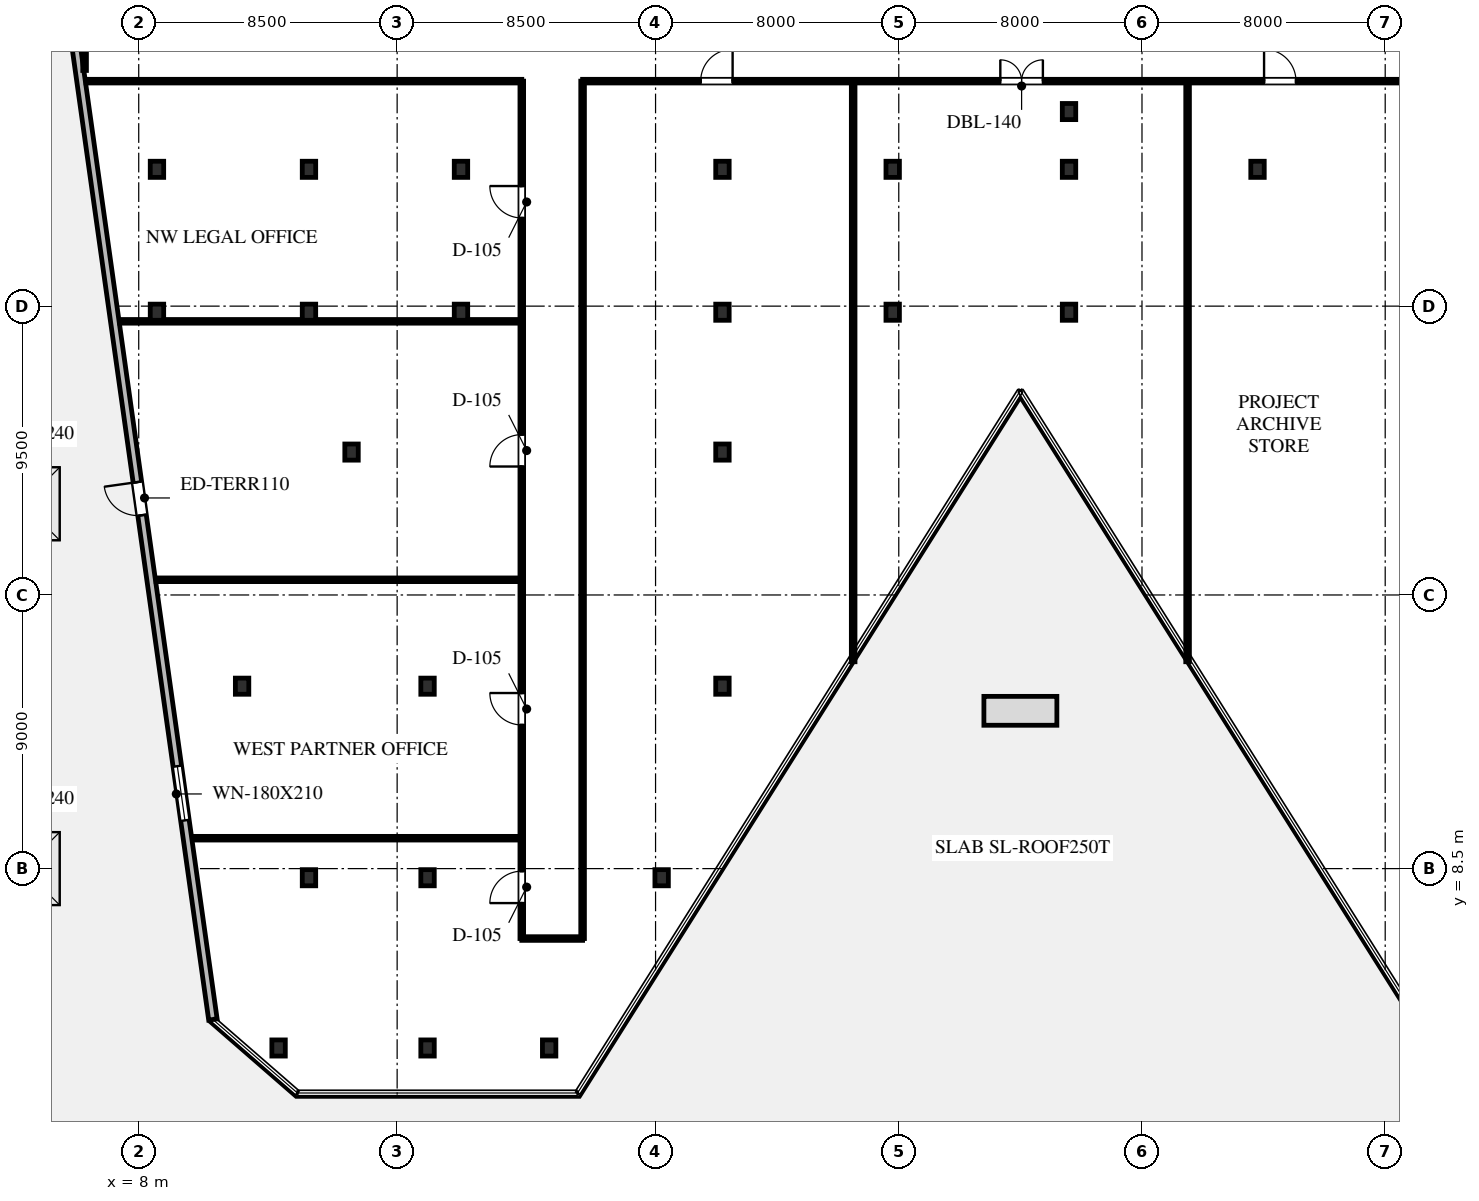
"""IFC4 building model, lengths in metres.
Left out: names, types, materials, properties, quantities, classifications, styles, units other than length and angle.
Written with IfcOpenShell. Run it as: python <this file> out.ifc"""

import sys

from ifc_helpers import new_model, si_unit, direction, frame, frame_2d, origin, origin_2d, place, context, subcontext, project, spatial, rectangle, i_section, extrude, element, fill, save


model = new_model("IFC4")
c1 = context("Model", 3, precision=1e-05, world=origin(), true_north=direction((0.0, 1.0)))
c2 = subcontext(c1, "Body", "Model", "MODEL_VIEW")
j1 = project(units=[si_unit("LENGTHUNIT", "METRE"), si_unit("PLANEANGLEUNIT", "RADIAN")], contexts=[c1])
p1 = place(None, origin())
s1 = spatial("IfcSite", under=j1, at=p1, CompositionType="ELEMENT")
p2 = place(p1, origin())
s2 = spatial("IfcBuilding", under=s1, at=p2, CompositionType="ELEMENT")
p3 = place(p2, frame((0.0, 0.0, 29.5)))
s3 = spatial("IfcBuildingStorey", under=s2, at=p3, CompositionType="ELEMENT", Elevation=29.5)
for number, where, z_axis, x_axis in (
    (1, (12.6, 2.6, 0.0), (0.0, 0.0, 1.0), (1.0, 0.0, 0.0)),
    (2, (15.0, 22.2, 0.0), (0.0, 0.0, 1.0), (1.0, 0.0, 0.0)),
    (3, (27.2, 22.2, 0.0), (0.0, 0.0, 1.0), (1.0, 0.0, 0.0)),
    (4, (8.6, 26.8, 0.0), (0.0, 0.0, 1.0), (1.0, 0.0, 0.0)),
    (5, (13.6, 26.8, 0.0), (0.0, 0.0, 1.0), (1.0, 0.0, 0.0)),
    (6, (18.6, 26.8, 0.0), (0.0, 0.0, 1.0), (1.0, 0.0, 0.0)),
    (7, (27.2, 26.8, 0.0), (0.0, 0.0, 1.0), (1.0, 0.0, 0.0)),
    (8, (32.8, 26.8, 0.0), (0.0, 0.0, 1.0), (1.0, 0.0, 0.0)),
    (9, (38.6, 26.8, 0.0), (0.0, 0.0, 1.0), (1.0, 0.0, 0.0)),
    (10, (8.6, 31.5, 0.0), (0.0, 0.0, 1.0), (1.0, 0.0, 0.0)),
    (11, (13.6, 31.5, 0.0), (0.0, 0.0, 1.0), (1.0, 0.0, 0.0)),
    (12, (17.5, 2.6, 0.0), (0.0, 0.0, 1.0), (1.0, 0.0, 0.0)),
    (13, (18.6, 31.5, 0.0), (0.0, 0.0, 1.0), (1.0, 0.0, 0.0)),
    (14, (27.2, 31.5, 0.0), (0.0, 0.0, 1.0), (1.0, 0.0, 0.0)),
    (15, (32.8, 31.5, 0.0), (0.0, 0.0, 1.0), (1.0, 0.0, 0.0)),
    (16, (38.6, 31.5, 0.0), (0.0, 0.0, 1.0), (1.0, 0.0, 0.0)),
    (17, (44.8, 31.5, 0.0), (0.0, 0.0, 1.0), (1.0, 0.0, 0.0)),
    (18, (21.5, 2.6, 0.0), (0.0, 0.0, 1.0), (1.0, 0.0, 0.0)),
    (19, (13.6, 8.2, 0.0), (0.0, 0.0, 1.0), (1.0, 0.0, 0.0)),
    (20, (17.5, 8.2, 0.0), (0.0, 0.0, 1.0), (1.0, 0.0, 0.0)),
    (21, (25.2, 8.2, 0.0), (0.0, 0.0, 1.0), (1.0, 0.0, 0.0)),
    (22, (11.4, 14.5, 0.0), (0.0, 0.0, 1.0), (1.0, 0.0, 0.0)),
    (23, (17.5, 14.5, 0.0), (0.0, 0.0, 1.0), (1.0, 0.0, 0.0)),
    (24, (27.2, 14.5, 0.0), (0.0, 0.0, 1.0), (1.0, 0.0, 0.0)),
    (25, (38.6, 33.4, 0.0), (0.0, 0.0, 1.0), (1.0, 0.0, 0.0)),
):
    element("IfcColumn", number, at=place(p3, frame(where, z_axis=z_axis, x_axis=x_axis)), inside=s3, PredefinedType="COLUMN", context=c2, shape_type="SweptSolid", body=[
        extrude(i_section(OverallWidth=0.442, OverallDepth=0.531, WebThickness=0.066, FlangeThickness=0.106, FilletRadius=0.03, at=origin_2d()), origin(), (0.0, 0.0, 1.0), 4.0),
    ])
p4 = place(p3, frame((10.44, 3.537, 0.0), z_axis=(0.0, 0.0, 1.0), x_axis=(-0.139174610616, 0.990267856572, 0.0)))
e26 = element("IfcWall", 26, at=p4, inside=s3, PredefinedType="STANDARD", context=c2, shape_type="SweptSolid", body=[
    extrude(rectangle(XDim=34.6, YDim=0.28, at=frame_2d((17.3, 0.0))), origin(), (0.0, 0.0, 1.0), 3.74),
])
p5 = place(p4, frame((16.75, 0.0, 0.0)))
e27 = element("IfcOpeningElement", 27, at=p5, cuts=e26, PredefinedType="OPENING", context=c2, shape_type="SweptSolid", body=[
    extrude(rectangle(XDim=1.1, YDim=2.2, at=frame_2d((0.55, 1.1))), frame((0.0, 0.15, 0.0), z_axis=(0.0, -1.0, 0.0), x_axis=(1.0, 0.0, 0.0)), (0.0, 0.0, 1.0), 0.3),
])
p6 = place(p4, frame((6.614, 0.0, 0.65)))
e28 = element("IfcOpeningElement", 28, at=p6, cuts=e26, PredefinedType="OPENING", context=c2, shape_type="SweptSolid", body=[
    extrude(rectangle(XDim=1.8, YDim=2.1, at=frame_2d((0.9, 1.05))), frame((0.0, 0.15, 0.0), z_axis=(0.0, -1.0, 0.0), x_axis=(1.0, 0.0, 0.0)), (0.0, 0.0, 1.0), 0.3),
])
p7 = place(p3, frame((6.269, 34.4, 0.0), z_axis=(0.0, 0.0, 1.0), x_axis=(1.0, 0.0, 0.0)))
e29 = element("IfcWall", 29, at=p7, inside=s3, PredefinedType="PARTITIONING", context=c2, shape_type="SweptSolid", body=[
    extrude(rectangle(XDim=14.331, YDim=0.12, at=frame_2d((7.166, 0.0))), origin(), (0.0, 0.0, 1.0), 2.813),
])
p8 = place(p3, frame((22.6, 34.4, 0.0), z_axis=(0.0, 0.0, 1.0), x_axis=(1.0, 0.0, 0.0)))
e30 = element("IfcWall", 30, at=p8, inside=s3, PredefinedType="PARTITIONING", context=c2, shape_type="SweptSolid", body=[
    extrude(rectangle(XDim=30.3, YDim=0.12, at=frame_2d((15.15, 0.0))), origin(), (0.0, 0.0, 1.0), 2.813),
])
p9 = place(p8, frame((3.885, 0.0, 0.0)))
e31 = element("IfcOpeningElement", 31, at=p9, cuts=e30, PredefinedType="OPENING", context=c2, shape_type="SweptSolid", body=[
    extrude(rectangle(XDim=1.05, YDim=2.2, at=frame_2d((0.525, 1.1))), frame((0.0, 0.07, 0.0), z_axis=(0.0, -1.0, 0.0), x_axis=(1.0, 0.0, 0.0)), (0.0, 0.0, 1.0), 0.14),
])
p10 = place(p8, frame((13.74, 0.0, 0.0)))
e32 = element("IfcOpeningElement", 32, at=p10, cuts=e30, PredefinedType="OPENING", context=c2, shape_type="SweptSolid", body=[
    extrude(rectangle(XDim=1.4, YDim=2.2, at=frame_2d((0.7, 1.1))), frame((0.0, 0.07, 0.0), z_axis=(0.0, -1.0, 0.0), x_axis=(1.0, 0.0, 0.0)), (0.0, 0.0, 1.0), 0.14),
])
p11 = place(p8, frame((22.416, 0.0, 0.0)))
e33 = element("IfcOpeningElement", 33, at=p11, cuts=e30, PredefinedType="OPENING", context=c2, shape_type="SweptSolid", body=[
    extrude(rectangle(XDim=1.05, YDim=2.2, at=frame_2d((0.525, 1.1))), frame((0.0, 0.07, 0.0), z_axis=(0.0, -1.0, 0.0), x_axis=(1.0, 0.0, 0.0)), (0.0, 0.0, 1.0), 0.14),
])
p12 = place(p3, frame((6.22, 34.751, 0.0), z_axis=(0.0, 0.0, 1.0), x_axis=(0.0, 1.0, 0.0)))
e34 = element("IfcWall", 34, at=p12, inside=s3, PredefinedType="PARTITIONING", context=c2, shape_type="SweptSolid", body=[
    extrude(rectangle(XDim=3.299, YDim=0.12, at=frame_2d((1.649, 0.0))), origin(), (0.0, 0.0, 1.0), 3.74),
])
p13 = place(p3, frame((20.6, 6.2, 0.0), z_axis=(0.0, 0.0, 1.0), x_axis=(0.0, 1.0, 0.0)))
e35 = element("IfcWall", 35, at=p13, inside=s3, PredefinedType="PARTITIONING", context=c2, shape_type="SweptSolid", body=[
    extrude(rectangle(XDim=28.2, YDim=0.12, at=frame_2d((14.1, 0.0))), origin(), (0.0, 0.0, 1.0), 2.813),
])
p14 = place(p13, frame((1.166, 0.0, 0.0)))
e36 = element("IfcOpeningElement", 36, at=p14, cuts=e35, PredefinedType="OPENING", context=c2, shape_type="SweptSolid", body=[
    extrude(rectangle(XDim=1.05, YDim=2.2, at=frame_2d((0.525, 1.1))), frame((0.0, 0.07, 0.0), z_axis=(0.0, -1.0, 0.0), x_axis=(1.0, 0.0, 0.0)), (0.0, 0.0, 1.0), 0.14),
])
p15 = place(p13, frame((7.025, 0.0, 0.0)))
e37 = element("IfcOpeningElement", 37, at=p15, cuts=e35, PredefinedType="OPENING", context=c2, shape_type="SweptSolid", body=[
    extrude(rectangle(XDim=1.05, YDim=2.2, at=frame_2d((0.525, 1.1))), frame((0.0, 0.07, 0.0), z_axis=(0.0, -1.0, 0.0), x_axis=(1.0, 0.0, 0.0)), (0.0, 0.0, 1.0), 0.14),
])
p16 = place(p13, frame((15.525, 0.0, 0.0)))
e38 = element("IfcOpeningElement", 38, at=p16, cuts=e35, PredefinedType="OPENING", context=c2, shape_type="SweptSolid", body=[
    extrude(rectangle(XDim=1.05, YDim=2.2, at=frame_2d((0.525, 1.1))), frame((0.0, 0.07, 0.0), z_axis=(0.0, -1.0, 0.0), x_axis=(1.0, 0.0, 0.0)), (0.0, 0.0, 1.0), 0.14),
])
p17 = place(p13, frame((23.7, 0.0, 0.0)))
e39 = element("IfcOpeningElement", 39, at=p17, cuts=e35, PredefinedType="OPENING", context=c2, shape_type="SweptSolid", body=[
    extrude(rectangle(XDim=1.05, YDim=2.2, at=frame_2d((0.525, 1.1))), frame((0.0, 0.07, 0.0), z_axis=(0.0, -1.0, 0.0), x_axis=(1.0, 0.0, 0.0)), (0.0, 0.0, 1.0), 0.14),
])
p18 = place(p3, frame((22.6, 6.2, 0.0), z_axis=(0.0, 0.0, 1.0), x_axis=(0.0, 1.0, 0.0)))
e40 = element("IfcWall", 40, at=p18, inside=s3, PredefinedType="PARTITIONING", context=c2, shape_type="SweptSolid", body=[
    extrude(rectangle(XDim=28.2, YDim=0.12, at=frame_2d((14.1, 0.0))), origin(), (0.0, 0.0, 1.0), 2.813),
])
p19 = place(p3, frame((20.6, 6.2, 0.0), z_axis=(0.0, 0.0, 1.0), x_axis=(1.0, 0.0, 0.0)))
e41 = element("IfcWall", 41, at=p19, inside=s3, PredefinedType="PARTITIONING", context=c2, shape_type="SweptSolid", body=[
    extrude(rectangle(XDim=2.0, YDim=0.12, at=frame_2d((1.0, 0.0))), origin(), (0.0, 0.0, 1.0), 2.978),
])
p20 = place(p3, frame((9.769, 9.5, 0.0), z_axis=(0.0, 0.0, 1.0), x_axis=(1.0, 0.0, 0.0)))
e42 = element("IfcWall", 42, at=p20, inside=s3, PredefinedType="PARTITIONING", context=c2, shape_type="SweptSolid", body=[
    extrude(rectangle(XDim=10.763, YDim=0.12, at=frame_2d((5.382, 0.0))), origin(), (0.0, 0.0, 1.0), 2.813),
])
p21 = place(p3, frame((8.574, 18.0, 0.0), z_axis=(0.0, 0.0, 1.0), x_axis=(1.0, 0.0, 0.0)))
e43 = element("IfcWall", 43, at=p21, inside=s3, PredefinedType="PARTITIONING", context=c2, shape_type="SweptSolid", body=[
    extrude(rectangle(XDim=11.958, YDim=0.12, at=frame_2d((5.979, 0.0))), origin(), (0.0, 0.0, 1.0), 2.978),
])
p22 = place(p3, frame((7.38, 26.5, 0.0), z_axis=(0.0, 0.0, 1.0), x_axis=(1.0, 0.0, 0.0)))
e44 = element("IfcWall", 44, at=p22, inside=s3, PredefinedType="PARTITIONING", context=c2, shape_type="SweptSolid", body=[
    extrude(rectangle(XDim=13.152, YDim=0.12, at=frame_2d((6.576, 0.0))), origin(), (0.0, 0.0, 1.0), 2.813),
])
for number, where, z_axis, x_axis in (
    (45, (31.5, 15.304, 0.0), (0.0, 0.0, 1.0), (0.0, 1.0, 0.0)),
    (46, (42.5, 15.304, 0.0), (0.0, 0.0, 1.0), (0.0, 1.0, 0.0)),
):
    element("IfcWall", number, at=place(p3, frame(where, z_axis=z_axis, x_axis=x_axis)), inside=s3, PredefinedType="PARTITIONING", context=c2, shape_type="SweptSolid", body=[
        extrude(rectangle(XDim=19.028, YDim=0.12, at=frame_2d((9.514, 0.0))), origin(), (0.0, 0.0, 1.0), 2.813),
    ])
p23 = place(p5, origin())
e47 = element("IfcDoor", 47, at=p23, inside=s3, OperationType="SINGLE_SWING_RIGHT", PredefinedType="DOOR", context=c2, shape_type="SweptSolid", body=[
    extrude(rectangle(XDim=1.1, YDim=2.2, at=frame_2d((0.55, 1.1))), frame((0.0, 0.025, 0.0), z_axis=(0.0, -1.0, 0.0), x_axis=(1.0, 0.0, 0.0)), (0.0, 0.0, 1.0), 0.05),
])
fill(e27, e47)
p24 = place(p6, origin())
e48 = element("IfcWindow", 48, at=p24, inside=s3, PartitioningType="SINGLE_PANEL", PredefinedType="WINDOW", context=c2, shape_type="SweptSolid", body=[
    extrude(rectangle(XDim=1.8, YDim=2.1, at=frame_2d((0.9, 1.05))), frame((0.0, 0.03, 0.0), z_axis=(0.0, -1.0, 0.0), x_axis=(1.0, 0.0, 0.0)), (0.0, 0.0, 1.0), 0.06),
])
fill(e28, e48)
p25 = place(p3, frame((0.0, 0.0, -0.25)))
p26 = place(p25, frame((4.2, 8.5, 0.0)))
p27 = place(p26, frame((0.0, 0.0, 0.2)))
e49 = element("IfcWindow", 49, at=p27, inside=s3, PartitioningType="SINGLE_PANEL", PredefinedType="SKYLIGHT", context=c2, shape_type="SweptSolid", body=[
    extrude(rectangle(XDim=2.4, YDim=2.4, at=origin_2d()), origin(), (0.0, 0.0, 1.0), 0.05),
])
p28 = place(p25, frame((4.2, 20.5, 0.0)))
p29 = place(p28, frame((0.0, 0.0, 0.2)))
e50 = element("IfcWindow", 50, at=p29, inside=s3, PartitioningType="SINGLE_PANEL", PredefinedType="SKYLIGHT", context=c2, shape_type="SweptSolid", body=[
    extrude(rectangle(XDim=2.4, YDim=2.4, at=origin_2d()), origin(), (0.0, 0.0, 1.0), 0.05),
])
p30 = place(p14, origin())
e51 = element("IfcDoor", 51, at=p30, inside=s3, OperationType="SINGLE_SWING_LEFT", PredefinedType="DOOR", context=c2, shape_type="SweptSolid", body=[
    extrude(rectangle(XDim=1.05, YDim=2.2, at=frame_2d((0.525, 1.1))), frame((0.0, 0.025, 0.0), z_axis=(0.0, -1.0, 0.0), x_axis=(1.0, 0.0, 0.0)), (0.0, 0.0, 1.0), 0.05),
])
fill(e36, e51)
p31 = place(p15, origin())
e52 = element("IfcDoor", 52, at=p31, inside=s3, OperationType="SINGLE_SWING_RIGHT", PredefinedType="DOOR", context=c2, shape_type="SweptSolid", body=[
    extrude(rectangle(XDim=1.05, YDim=2.2, at=frame_2d((0.525, 1.1))), frame((0.0, 0.025, 0.0), z_axis=(0.0, -1.0, 0.0), x_axis=(1.0, 0.0, 0.0)), (0.0, 0.0, 1.0), 0.05),
])
fill(e37, e52)
p32 = place(p16, origin())
e53 = element("IfcDoor", 53, at=p32, inside=s3, OperationType="SINGLE_SWING_LEFT", PredefinedType="DOOR", context=c2, shape_type="SweptSolid", body=[
    extrude(rectangle(XDim=1.05, YDim=2.2, at=frame_2d((0.525, 1.1))), frame((0.0, 0.025, 0.0), z_axis=(0.0, -1.0, 0.0), x_axis=(1.0, 0.0, 0.0)), (0.0, 0.0, 1.0), 0.05),
])
fill(e38, e53)
p33 = place(p17, origin())
e54 = element("IfcDoor", 54, at=p33, inside=s3, OperationType="SINGLE_SWING_RIGHT", PredefinedType="DOOR", context=c2, shape_type="SweptSolid", body=[
    extrude(rectangle(XDim=1.05, YDim=2.2, at=frame_2d((0.525, 1.1))), frame((0.0, 0.025, 0.0), z_axis=(0.0, -1.0, 0.0), x_axis=(1.0, 0.0, 0.0)), (0.0, 0.0, 1.0), 0.05),
])
fill(e39, e54)
p34 = place(p9, origin())
e55 = element("IfcDoor", 55, at=p34, inside=s3, OperationType="SINGLE_SWING_RIGHT", PredefinedType="DOOR", context=c2, shape_type="SweptSolid", body=[
    extrude(rectangle(XDim=1.05, YDim=2.2, at=frame_2d((0.525, 1.1))), frame((0.0, 0.025, 0.0), z_axis=(0.0, -1.0, 0.0), x_axis=(1.0, 0.0, 0.0)), (0.0, 0.0, 1.0), 0.05),
])
fill(e31, e55)
p35 = place(p10, origin())
e56 = element("IfcDoor", 56, at=p35, inside=s3, OperationType="DOUBLE_DOOR_SINGLE_SWING", PredefinedType="DOOR", context=c2, shape_type="SweptSolid", body=[
    extrude(rectangle(XDim=1.4, YDim=2.2, at=frame_2d((0.7, 1.1))), frame((0.0, 0.025, 0.0), z_axis=(0.0, -1.0, 0.0), x_axis=(1.0, 0.0, 0.0)), (0.0, 0.0, 1.0), 0.05),
])
fill(e32, e56)
p36 = place(p11, origin())
e57 = element("IfcDoor", 57, at=p36, inside=s3, OperationType="SINGLE_SWING_LEFT", PredefinedType="DOOR", context=c2, shape_type="SweptSolid", body=[
    extrude(rectangle(XDim=1.05, YDim=2.2, at=frame_2d((0.525, 1.1))), frame((0.0, 0.025, 0.0), z_axis=(0.0, -1.0, 0.0), x_axis=(1.0, 0.0, 0.0)), (0.0, 0.0, 1.0), 0.05),
])
fill(e33, e57)
save(model, sys.argv[1])
